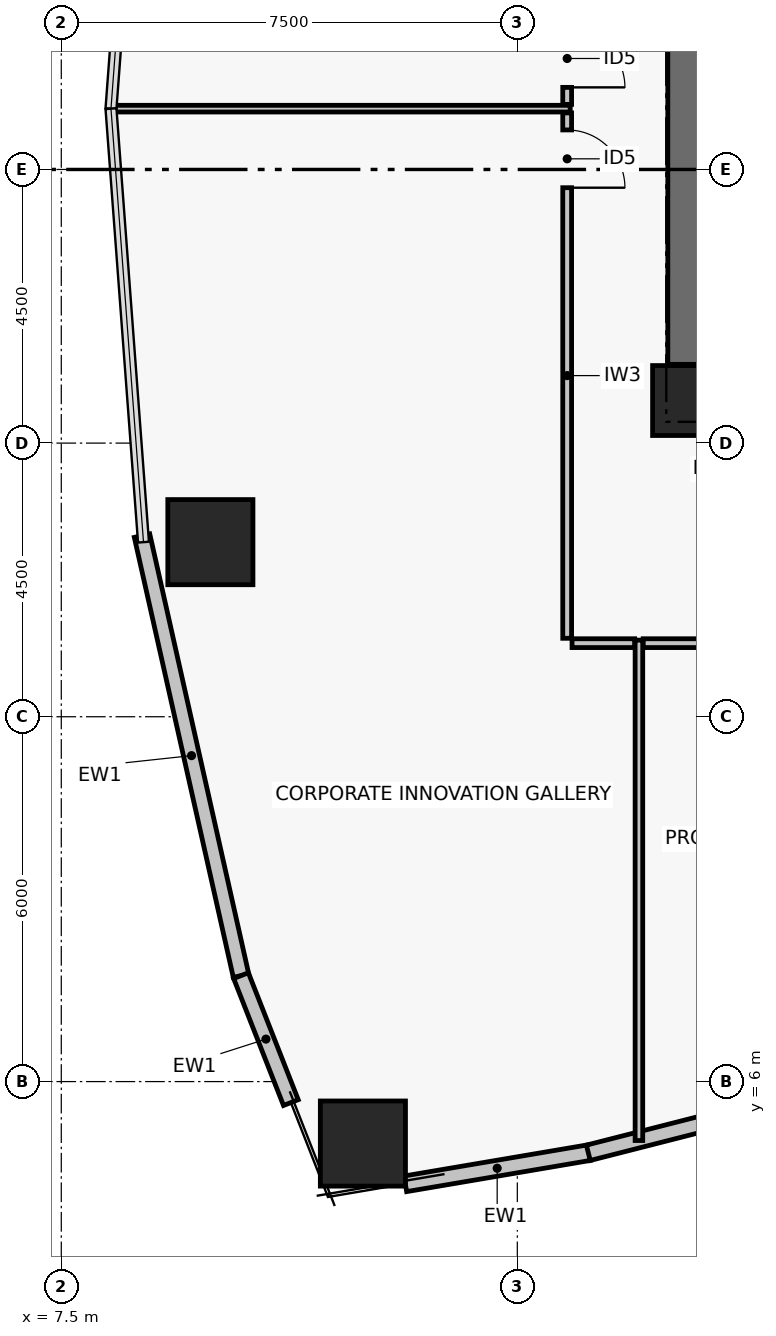
"""IFC4 building model, lengths in metres.
Left out: names, types, materials, properties, quantities, classifications, styles, units other than length and angle.
Written with IfcOpenShell. Run it as: python <this file> out.ifc"""

import sys

from ifc_helpers import new_model, si_unit, direction, frame, frame_2d, origin, origin_2d, place, context, subcontext, project, spatial, rectangle, hollow_rectangle, extrude, element, fill, save


model = new_model("IFC4")
c1 = context("Model", 3, precision=1e-05, world=origin(), true_north=direction((0.0, 1.0)))
c2 = subcontext(c1, "Body", "Model", "MODEL_VIEW")
j1 = project(units=[si_unit("LENGTHUNIT", "METRE"), si_unit("PLANEANGLEUNIT", "RADIAN")], contexts=[c1])
p1 = place(None, origin())
s1 = spatial("IfcSite", under=j1, at=p1, CompositionType="ELEMENT")
p2 = place(p1, origin())
s2 = spatial("IfcBuilding", under=s1, at=p2, CompositionType="ELEMENT")
p3 = place(p2, frame((0.0, 0.0, 7.2)))
s3 = spatial("IfcBuildingStorey", under=s2, at=p3, CompositionType="ELEMENT", Elevation=7.2)
p4 = place(p3, frame((17.8, 17.2, 0.0), z_axis=(0.0, 0.0, 1.0), x_axis=(1.0, 0.0, 0.0)))
e1 = element("IfcColumn", 1, at=p4, inside=s3, PredefinedType="COLUMN", context=c2, shape_type="SweptSolid", body=[
    extrude(rectangle(XDim=1.15, YDim=1.15, at=origin_2d()), origin(), (0.0, 0.0, 1.0), 4.8),
])
p5 = place(p3, frame((17.8, 17.795, 0.0), z_axis=(0.0, 0.0, 1.0), x_axis=(0.0, 1.0, 0.0)))
e2 = element("IfcWall", 2, at=p5, inside=s3, PredefinedType="SHEAR", context=c2, shape_type="SweptSolid", body=[
    extrude(rectangle(XDim=8.41, YDim=0.65, at=frame_2d((4.205, 0.0))), origin(), (0.0, 0.0, 1.0), 4.48),
])
for number, where, z_axis, x_axis in (
    (3, (9.952, 14.871, 0.0), (0.0, 0.0, 1.0), (1.0, 0.0, 0.0)),
    (4, (12.46, 4.981, 0.0), (0.0, 0.0, 1.0), (1.0, 0.0, 0.0)),
):
    element("IfcColumn", number, at=place(p3, frame(where, z_axis=z_axis, x_axis=x_axis)), inside=s3, PredefinedType="COLUMN", context=c2, shape_type="SweptSolid", body=[
        extrude(hollow_rectangle(XDim=1.4, YDim=1.4, WallThickness=0.055, at=origin_2d()), origin(), (0.0, 0.0, 1.0), 4.8),
    ])
p6 = place(p3, frame((10.456, 7.742, 0.0), z_axis=(0.0, 0.0, 1.0), x_axis=(-0.219512195122, 0.975609756098, 0.0)))
e5 = element("IfcWall", 5, at=p6, inside=s3, PredefinedType="PARTITIONING", context=c2, shape_type="SweptSolid", body=[
    extrude(rectangle(XDim=7.417, YDim=0.26, at=frame_2d((3.708, 0.0))), origin(), (0.0, 0.0, 1.0), 4.48),
])
p7 = place(p3, frame((11.276, 5.655, 0.0), z_axis=(0.0, 0.0, 1.0), x_axis=(-0.365527759733, 0.930800438797, 0.0)))
e6 = element("IfcWall", 6, at=p7, inside=s3, PredefinedType="PARTITIONING", context=c2, shape_type="SweptSolid", body=[
    extrude(rectangle(XDim=2.243, YDim=0.26, at=frame_2d((1.122, 0.0))), origin(), (0.0, 0.0, 1.0), 4.48),
])
p8 = place(p3, frame((16.179, 4.831, 0.0), z_axis=(0.0, 0.0, 1.0), x_axis=(-0.985905166387, -0.167305119144, 0.0)))
e7 = element("IfcWall", 7, at=p8, inside=s3, PredefinedType="PARTITIONING", context=c2, shape_type="SweptSolid", body=[
    extrude(rectangle(XDim=3.064, YDim=0.26, at=frame_2d((1.532, 0.0))), origin(), (0.0, 0.0, 1.0), 4.48),
])
p9 = place(p3, frame((24.081, 6.847, 0.0), z_axis=(0.0, 0.0, 1.0), x_axis=(-0.968981557045, -0.247133045354, 0.0)))
e8 = element("IfcWall", 8, at=p9, inside=s3, PredefinedType="PARTITIONING", context=c2, shape_type="SweptSolid", body=[
    extrude(rectangle(XDim=8.167, YDim=0.26, at=frame_2d((4.083, 0.0))), origin(), (0.0, 0.0, 1.0), 4.48),
])
p10 = place(p3, frame((15.82, 21.93, 0.0), z_axis=(0.0, 0.0, 1.0), x_axis=(0.0, -1.0, 0.0)))
e9 = element("IfcWall", 9, at=p10, inside=s3, PredefinedType="PARTITIONING", context=c2, shape_type="SweptSolid", body=[
    extrude(rectangle(XDim=8.64, YDim=0.145, at=frame_2d((4.32, 0.0))), origin(), (0.0, 0.0, 1.0), 3.56),
])
p11 = place(p10, frame((0.28, 0.0, 0.0)))
e10 = element("IfcOpeningElement", 10, at=p11, cuts=e9, PredefinedType="OPENING", context=c2, shape_type="SweptSolid", body=[
    extrude(rectangle(XDim=0.95, YDim=2.06, at=frame_2d((0.475, 1.03))), frame((0.0, 0.083, 0.0), z_axis=(0.0, -1.0, 0.0), x_axis=(1.0, 0.0, 0.0)), (0.0, 0.0, 1.0), 0.165),
])
p12 = place(p3, frame((15.9, 13.21, 0.0), z_axis=(0.0, 0.0, 1.0), x_axis=(1.0, 0.0, 0.0)))
e11 = element("IfcWall", 11, at=p12, inside=s3, PredefinedType="PARTITIONING", context=c2, shape_type="SweptSolid", body=[
    extrude(rectangle(XDim=1.03, YDim=0.145, at=frame_2d((0.515, 0.0))), origin(), (0.0, 0.0, 1.0), 3.56),
])
p13 = place(p3, frame((17.07, 13.21, 0.0), z_axis=(0.0, 0.0, 1.0), x_axis=(1.0, 0.0, 0.0)))
e12 = element("IfcWall", 12, at=p13, inside=s3, PredefinedType="PARTITIONING", context=c2, shape_type="SweptSolid", body=[
    extrude(rectangle(XDim=14.36, YDim=0.145, at=frame_2d((7.18, 0.0))), origin(), (0.0, 0.0, 1.0), 3.56),
])
p14 = place(p13, frame((8.311, 0.0, 0.0)))
e13 = element("IfcOpeningElement", 13, at=p14, cuts=e12, PredefinedType="OPENING", context=c2, shape_type="SweptSolid", body=[
    extrude(rectangle(XDim=0.95, YDim=2.06, at=frame_2d((0.475, 1.03))), frame((0.0, 0.083, 0.0), z_axis=(0.0, -1.0, 0.0), x_axis=(1.0, 0.0, 0.0)), (0.0, 0.0, 1.0), 0.165),
])
p15 = place(p3, frame((15.82, 28.7, 0.0), z_axis=(0.0, 0.0, 1.0), x_axis=(0.0, -1.0, 0.0)))
e14 = element("IfcWall", 14, at=p15, inside=s3, PredefinedType="PARTITIONING", context=c2, shape_type="SweptSolid", body=[
    extrude(rectangle(XDim=6.63, YDim=0.145, at=frame_2d((3.315, 0.0))), origin(), (0.0, 0.0, 1.0), 3.56),
])
p16 = place(p15, frame((5.4, 0.0, 0.0)))
e15 = element("IfcOpeningElement", 15, at=p16, cuts=e14, PredefinedType="OPENING", context=c2, shape_type="SweptSolid", body=[
    extrude(rectangle(XDim=0.95, YDim=2.06, at=frame_2d((0.475, 1.03))), frame((0.0, 0.083, 0.0), z_axis=(0.0, -1.0, 0.0), x_axis=(1.0, 0.0, 0.0)), (0.0, 0.0, 1.0), 0.165),
])
p17 = place(p3, frame((17.0, 5.031, 0.0), z_axis=(0.0, 0.0, 1.0), x_axis=(0.0, 1.0, 0.0)))
e16 = element("IfcWall", 16, at=p17, inside=s3, PredefinedType="PARTITIONING", context=c2, shape_type="SweptSolid", body=[
    extrude(rectangle(XDim=8.229, YDim=0.125, at=frame_2d((4.115, 0.0))), origin(), (0.0, 0.0, 1.0), 3.86),
])
p18 = place(p3, frame((8.307, 22.0, 0.0), z_axis=(0.0, 0.0, 1.0), x_axis=(1.0, 0.0, 0.0)))
e17 = element("IfcWall", 17, at=p18, inside=s3, PredefinedType="PARTITIONING", context=c2, shape_type="SweptSolid", body=[
    extrude(rectangle(XDim=7.563, YDim=0.11, at=frame_2d((3.781, 0.0))), origin(), (0.0, 0.0, 1.0), 3.86),
])
p19 = place(p11, origin())
e18 = element("IfcDoor", 18, at=p19, inside=s3, OperationType="SINGLE_SWING_RIGHT", PredefinedType="DOOR", context=c2, shape_type="SweptSolid", body=[
    extrude(rectangle(XDim=0.95, YDim=2.06, at=frame_2d((0.475, 1.03))), frame((0.0, 0.025, 0.0), z_axis=(0.0, -1.0, 0.0), x_axis=(1.0, 0.0, 0.0)), (0.0, 0.0, 1.0), 0.05),
])
fill(e10, e18)
p20 = place(p16, origin())
e19 = element("IfcDoor", 19, at=p20, inside=s3, OperationType="SINGLE_SWING_RIGHT", PredefinedType="DOOR", context=c2, shape_type="SweptSolid", body=[
    extrude(rectangle(XDim=0.95, YDim=2.06, at=frame_2d((0.475, 1.03))), frame((0.0, 0.025, 0.0), z_axis=(0.0, -1.0, 0.0), x_axis=(1.0, 0.0, 0.0)), (0.0, 0.0, 1.0), 0.05),
])
fill(e15, e19)
save(model, sys.argv[1])
